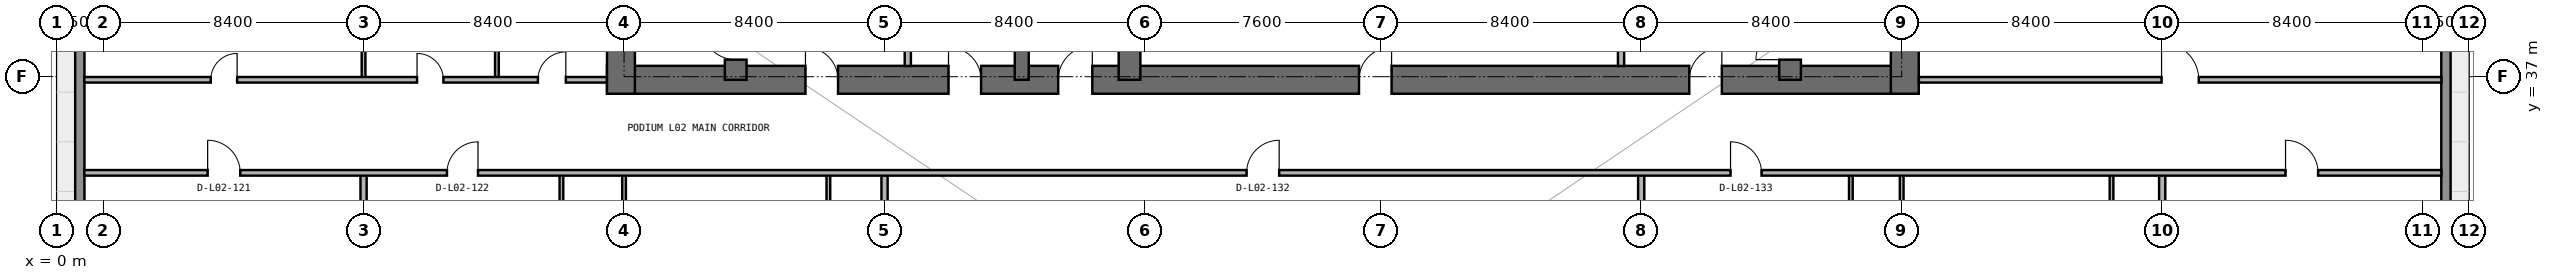
"""IFC4 building model, lengths in metres.
Left out: names, types, materials, properties, quantities, classifications, styles, units other than length and angle.
Written with IfcOpenShell. Run it as: python <this file> out.ifc"""

import sys

from ifc_helpers import new_model, si_unit, direction, frame, frame_2d, origin, place, context, subcontext, project, spatial, rectangle, extrude, element, fill, save


model = new_model("IFC4")
c1 = context("Model", 3, precision=1e-05, world=origin(), true_north=direction((0.0, 1.0)))
c2 = subcontext(c1, "Body", "Model", "MODEL_VIEW")
j1 = project(units=[si_unit("LENGTHUNIT", "METRE"), si_unit("PLANEANGLEUNIT", "RADIAN")], contexts=[c1])
p1 = place(None, origin())
s1 = spatial("IfcSite", under=j1, at=p1, CompositionType="ELEMENT")
p2 = place(p1, origin())
s2 = spatial("IfcBuilding", under=s1, at=p2, CompositionType="ELEMENT")
p3 = place(p2, frame((0.0, 0.0, 10.2)))
s3 = spatial("IfcBuildingStorey", under=s2, at=p3, CompositionType="ELEMENT", Elevation=10.2)
p4 = place(p3, frame((17.75, 36.9, 0.0), z_axis=(0.0, 0.0, 1.0), x_axis=(1.0, 0.0, 0.0)))
e1 = element("IfcWall", 1, at=p4, inside=s3, PredefinedType="SHEAR", context=c2, shape_type="SweptSolid", body=[
    extrude(rectangle(XDim=42.3, YDim=0.9, at=frame_2d((21.15, 0.0))), origin(), (0.0, 0.0, 1.0), 4.5),
])
p5 = place(p4, frame((14.55, 0.0, 0.0)))
e2 = element("IfcOpeningElement", 2, at=p5, cuts=e1, PredefinedType="OPENING", context=c2, shape_type="SweptSolid", body=[
    extrude(rectangle(XDim=1.1, YDim=2.15, at=frame_2d((0.55, 1.075))), frame((0.0, 0.46, 0.0), z_axis=(0.0, -1.0, 0.0), x_axis=(1.0, 0.0, 0.0)), (0.0, 0.0, 1.0), 0.92),
])
p6 = place(p4, frame((6.4, 0.0, 0.0)))
e3 = element("IfcOpeningElement", 3, at=p6, cuts=e1, PredefinedType="OPENING", context=c2, shape_type="SweptSolid", body=[
    extrude(rectangle(XDim=1.05, YDim=2.15, at=frame_2d((0.525, 1.075))), frame((0.0, 0.46, 0.0), z_axis=(0.0, -1.0, 0.0), x_axis=(1.0, 0.0, 0.0)), (0.0, 0.0, 1.0), 0.92),
])
p7 = place(p4, frame((34.9, 0.0, 0.0)))
e4 = element("IfcOpeningElement", 4, at=p7, cuts=e1, PredefinedType="OPENING", context=c2, shape_type="SweptSolid", body=[
    extrude(rectangle(XDim=1.05, YDim=2.15, at=frame_2d((0.525, 1.075))), frame((0.0, 0.46, 0.0), z_axis=(0.0, -1.0, 0.0), x_axis=(1.0, 0.0, 0.0)), (0.0, 0.0, 1.0), 0.92),
])
p8 = place(p4, frame((11.012, 0.0, 0.0)))
e5 = element("IfcOpeningElement", 5, at=p8, cuts=e1, PredefinedType="OPENING", context=c2, shape_type="SweptSolid", body=[
    extrude(rectangle(XDim=1.05, YDim=2.15, at=frame_2d((0.525, 1.075))), frame((0.0, 0.46, 0.0), z_axis=(0.0, -1.0, 0.0), x_axis=(1.0, 0.0, 0.0)), (0.0, 0.0, 1.0), 0.92),
])
p9 = place(p4, frame((24.25, 0.0, 0.0)))
e6 = element("IfcOpeningElement", 6, at=p9, cuts=e1, PredefinedType="OPENING", context=c2, shape_type="SweptSolid", body=[
    extrude(rectangle(XDim=1.05, YDim=2.15, at=frame_2d((0.525, 1.075))), frame((0.0, 0.46, 0.0), z_axis=(0.0, -1.0, 0.0), x_axis=(1.0, 0.0, 0.0)), (0.0, 0.0, 1.0), 0.92),
])
for number, where, z_axis, x_axis in (
    (7, (18.2, 36.45, 0.0), (0.0, 0.0, 1.0), (0.0, 1.0, 0.0)),
    (8, (59.6, 36.45, 0.0), (0.0, 0.0, 1.0), (0.0, 1.0, 0.0)),
):
    element("IfcWall", number, at=place(p3, frame(where, z_axis=z_axis, x_axis=x_axis)), inside=s3, PredefinedType="SHEAR", context=c2, shape_type="SweptSolid", body=[
        extrude(rectangle(XDim=14.15, YDim=0.9, at=frame_2d((7.075, 0.0))), origin(), (0.0, 0.0, 1.0), 4.5),
    ])
p10 = place(p3, frame((21.9, 36.9, 0.0), z_axis=(0.0, 0.0, 1.0), x_axis=(0.0, 1.0, 0.0)))
e9 = element("IfcWall", 9, at=p10, inside=s3, PredefinedType="SHEAR", context=c2, shape_type="SweptSolid", body=[
    extrude(rectangle(XDim=9.675, YDim=0.7, at=frame_2d((4.837, 0.0))), origin(), (0.0, 0.0, 1.0), 4.5),
])
p11 = place(p10, frame((0.65, 0.0, 0.0)))
e10 = element("IfcOpeningElement", 10, at=p11, cuts=e9, PredefinedType="OPENING", context=c2, shape_type="SweptSolid", body=[
    extrude(rectangle(XDim=1.1, YDim=2.15, at=frame_2d((0.55, 1.075))), frame((0.0, 0.36, 0.0), z_axis=(0.0, -1.0, 0.0), x_axis=(1.0, 0.0, 0.0)), (0.0, 0.0, 1.0), 0.72),
])
p12 = place(p3, frame((55.9, 36.9, 0.0), z_axis=(0.0, 0.0, 1.0), x_axis=(0.0, 1.0, 0.0)))
e11 = element("IfcWall", 11, at=p12, inside=s3, PredefinedType="SHEAR", context=c2, shape_type="SweptSolid", body=[
    extrude(rectangle(XDim=9.675, YDim=0.7, at=frame_2d((4.837, 0.0))), origin(), (0.0, 0.0, 1.0), 4.5),
])
p13 = place(p12, frame((0.65, 0.0, 0.0)))
e12 = element("IfcOpeningElement", 12, at=p13, cuts=e11, PredefinedType="OPENING", context=c2, shape_type="SweptSolid", body=[
    extrude(rectangle(XDim=1.1, YDim=2.15, at=frame_2d((0.55, 1.075))), frame((0.0, 0.36, 0.0), z_axis=(0.0, -1.0, 0.0), x_axis=(1.0, 0.0, 0.0)), (0.0, 0.0, 1.0), 0.72),
])
p14 = place(p3, frame((31.125, 36.9, 0.0), z_axis=(0.0, 0.0, 1.0), x_axis=(0.0, 1.0, 0.0)))
e13 = element("IfcWall", 13, at=p14, inside=s3, PredefinedType="SHEAR", context=c2, shape_type="SweptSolid", body=[
    extrude(rectangle(XDim=9.675, YDim=0.45, at=frame_2d((4.837, 0.0))), origin(), (0.0, 0.0, 1.0), 4.5),
])
p15 = place(p3, frame((34.6, 36.9, 0.0), z_axis=(0.0, 0.0, 1.0), x_axis=(0.0, 1.0, 0.0)))
e14 = element("IfcWall", 14, at=p15, inside=s3, PredefinedType="SHEAR", context=c2, shape_type="SweptSolid", body=[
    extrude(rectangle(XDim=9.675, YDim=0.7, at=frame_2d((4.837, 0.0))), origin(), (0.0, 0.0, 1.0), 4.5),
])
for number, where, z_axis, x_axis in (
    (15, (0.75, 26.8, 0.0), (0.0, 0.0, 1.0), (0.0, 1.0, 0.0)),
    (16, (77.05, 52.6, 0.0), (0.0, 0.0, 1.0), (0.0, -1.0, 0.0)),
):
    element("IfcWall", number, at=place(p3, frame(where, z_axis=z_axis, x_axis=x_axis)), inside=s3, PredefinedType="STANDARD", context=c2, shape_type="SweptSolid", body=[
        extrude(rectangle(XDim=25.8, YDim=0.3, at=frame_2d((12.9, 0.0))), origin(), (0.0, 0.0, 1.0), 4.5),
    ])
p16 = place(p3, frame((9.9, 1.295, 0.0), z_axis=(0.0, 0.0, 1.0), x_axis=(0.0, 1.0, 0.0)))
e17 = element("IfcWall", 17, at=p16, inside=s3, PredefinedType="PARTITIONING", context=c2, shape_type="SweptSolid", body=[
    extrude(rectangle(XDim=32.605, YDim=0.2, at=frame_2d((16.302, 0.0))), origin(), (0.0, 0.0, 1.0), 3.464),
])
p17 = place(p3, frame((9.9, 36.9, 0.0), z_axis=(0.0, 0.0, 1.0), x_axis=(0.0, 1.0, 0.0)))
e18 = element("IfcWall", 18, at=p17, inside=s3, PredefinedType="PARTITIONING", context=c2, shape_type="SweptSolid", body=[
    extrude(rectangle(XDim=6.9, YDim=0.12, at=frame_2d((3.45, 0.0))), origin(), (0.0, 0.0, 1.0), 3.464),
])
p18 = place(p3, frame((14.2, 36.9, 0.0), z_axis=(0.0, 0.0, 1.0), x_axis=(0.0, 1.0, 0.0)))
e19 = element("IfcWall", 19, at=p18, inside=s3, PredefinedType="PARTITIONING", context=c2, shape_type="SweptSolid", body=[
    extrude(rectangle(XDim=6.9, YDim=0.12, at=frame_2d((3.45, 0.0))), origin(), (0.0, 0.0, 1.0), 4.5),
])
p19 = place(p3, frame((16.28, 28.8, 0.0), z_axis=(0.0, 0.0, 1.0), x_axis=(0.0, 1.0, 0.0)))
e20 = element("IfcWall", 20, at=p19, inside=s3, PredefinedType="PARTITIONING", context=c2, shape_type="SweptSolid", body=[
    extrude(rectangle(XDim=5.1, YDim=0.12, at=frame_2d((2.55, 0.0))), origin(), (0.0, 0.0, 1.0), 4.5),
])
p20 = place(p19, frame((2.125, 0.0, 0.0)))
e21 = element("IfcOpeningElement", 21, at=p20, cuts=e20, PredefinedType="OPENING", context=c2, shape_type="SweptSolid", body=[
    extrude(rectangle(XDim=0.85, YDim=2.1, at=frame_2d((0.425, 1.05))), frame((0.0, 0.07, 0.0), z_axis=(0.0, -1.0, 0.0), x_axis=(1.0, 0.0, 0.0)), (0.0, 0.0, 1.0), 0.14),
])
p21 = place(p3, frame((18.3, 1.295, 0.0), z_axis=(0.0, 0.0, 1.0), x_axis=(0.0, 1.0, 0.0)))
e22 = element("IfcWall", 22, at=p21, inside=s3, PredefinedType="PARTITIONING", context=c2, shape_type="SweptSolid", body=[
    extrude(rectangle(XDim=32.605, YDim=0.12, at=frame_2d((16.302, 0.0))), origin(), (0.0, 0.0, 1.0), 4.5),
])
p22 = place(p21, frame((24.655, 0.0, 0.0)))
e23 = element("IfcOpeningElement", 23, at=p22, cuts=e22, PredefinedType="OPENING", context=c2, shape_type="SweptSolid", body=[
    extrude(rectangle(XDim=0.9, YDim=2.15, at=frame_2d((0.45, 1.075))), frame((0.0, 0.07, 0.0), z_axis=(0.0, -1.0, 0.0), x_axis=(1.0, 0.0, 0.0)), (0.0, 0.0, 1.0), 0.14),
])
p23 = place(p3, frame((24.889, 28.6, 0.0), z_axis=(0.0, 0.0, 1.0), x_axis=(0.0, 1.0, 0.0)))
e24 = element("IfcWall", 24, at=p23, inside=s3, PredefinedType="PARTITIONING", context=c2, shape_type="SweptSolid", body=[
    extrude(rectangle(XDim=5.3, YDim=0.12, at=frame_2d((2.65, 0.0))), origin(), (0.0, 0.0, 1.0), 4.5),
])
p24 = place(p23, frame((2.225, 0.0, 0.0)))
e25 = element("IfcOpeningElement", 25, at=p24, cuts=e24, PredefinedType="OPENING", context=c2, shape_type="SweptSolid", body=[
    extrude(rectangle(XDim=0.85, YDim=2.1, at=frame_2d((0.425, 1.05))), frame((0.0, 0.07, 0.0), z_axis=(0.0, -1.0, 0.0), x_axis=(1.0, 0.0, 0.0)), (0.0, 0.0, 1.0), 0.14),
])
p25 = place(p3, frame((26.7, 1.295, 0.0), z_axis=(0.0, 0.0, 1.0), x_axis=(0.0, 1.0, 0.0)))
e26 = element("IfcWall", 26, at=p25, inside=s3, PredefinedType="PARTITIONING", context=c2, shape_type="SweptSolid", body=[
    extrude(rectangle(XDim=32.605, YDim=0.2, at=frame_2d((16.302, 0.0))), origin(), (0.0, 0.0, 1.0), 3.464),
])
for number, where, z_axis, x_axis in (
    (27, (27.45, 37.345, 0.0), (0.0, 0.0, 1.0), (0.0, 1.0, 0.0)),
    (28, (50.45, 37.345, 0.0), (0.0, 0.0, 1.0), (0.0, 1.0, 0.0)),
):
    element("IfcWall", number, at=place(p3, frame(where, z_axis=z_axis, x_axis=x_axis)), inside=s3, PredefinedType="PARTITIONING", context=c2, shape_type="SweptSolid", body=[
        extrude(rectangle(XDim=5.385, YDim=0.2, at=frame_2d((2.692, 0.0))), origin(), (0.0, 0.0, 1.0), 4.5),
    ])
p26 = place(p3, frame((51.1, 1.295, 0.0), z_axis=(0.0, 0.0, 1.0), x_axis=(0.0, 1.0, 0.0)))
e29 = element("IfcWall", 29, at=p26, inside=s3, PredefinedType="PARTITIONING", context=c2, shape_type="SweptSolid", body=[
    extrude(rectangle(XDim=32.605, YDim=0.2, at=frame_2d((16.302, 0.0))), origin(), (0.0, 0.0, 1.0), 3.464),
])
p27 = place(p3, frame((57.861, 27.92, 0.0), z_axis=(0.0, 0.0, 1.0), x_axis=(0.0, 1.0, 0.0)))
e30 = element("IfcWall", 30, at=p27, inside=s3, PredefinedType="PARTITIONING", context=c2, shape_type="SweptSolid", body=[
    extrude(rectangle(XDim=5.98, YDim=0.12, at=frame_2d((2.99, 0.0))), origin(), (0.0, 0.0, 1.0), 3.873),
])
p28 = place(p27, frame((2.565, 0.0, 0.0)))
e31 = element("IfcOpeningElement", 31, at=p28, cuts=e30, PredefinedType="OPENING", context=c2, shape_type="SweptSolid", body=[
    extrude(rectangle(XDim=0.85, YDim=2.1, at=frame_2d((0.425, 1.05))), frame((0.0, 0.07, 0.0), z_axis=(0.0, -1.0, 0.0), x_axis=(1.0, 0.0, 0.0)), (0.0, 0.0, 1.0), 0.14),
])
p29 = place(p3, frame((59.5, 1.295, 0.0), z_axis=(0.0, 0.0, 1.0), x_axis=(0.0, 1.0, 0.0)))
e32 = element("IfcWall", 32, at=p29, inside=s3, PredefinedType="PARTITIONING", context=c2, shape_type="SweptSolid", body=[
    extrude(rectangle(XDim=32.605, YDim=0.12, at=frame_2d((16.302, 0.0))), origin(), (0.0, 0.0, 1.0), 4.5),
])
p30 = place(p29, frame((23.775, 0.0, 0.0)))
e33 = element("IfcOpeningElement", 33, at=p30, cuts=e32, PredefinedType="OPENING", context=c2, shape_type="SweptSolid", body=[
    extrude(rectangle(XDim=0.9, YDim=2.15, at=frame_2d((0.45, 1.075))), frame((0.0, 0.07, 0.0), z_axis=(0.0, -1.0, 0.0), x_axis=(1.0, 0.0, 0.0)), (0.0, 0.0, 1.0), 0.14),
])
p31 = place(p3, frame((66.266, 27.72, 0.0), z_axis=(0.0, 0.0, 1.0), x_axis=(0.0, 1.0, 0.0)))
e34 = element("IfcWall", 34, at=p31, inside=s3, PredefinedType="PARTITIONING", context=c2, shape_type="SweptSolid", body=[
    extrude(rectangle(XDim=6.18, YDim=0.12, at=frame_2d((3.09, 0.0))), origin(), (0.0, 0.0, 1.0), 4.5),
])
p32 = place(p31, frame((2.815, 0.0, 0.0)))
e35 = element("IfcOpeningElement", 35, at=p32, cuts=e34, PredefinedType="OPENING", context=c2, shape_type="SweptSolid", body=[
    extrude(rectangle(XDim=0.85, YDim=2.1, at=frame_2d((0.425, 1.05))), frame((0.0, 0.07, 0.0), z_axis=(0.0, -1.0, 0.0), x_axis=(1.0, 0.0, 0.0)), (0.0, 0.0, 1.0), 0.14),
])
p33 = place(p3, frame((67.9, 1.295, 0.0), z_axis=(0.0, 0.0, 1.0), x_axis=(0.0, 1.0, 0.0)))
e36 = element("IfcWall", 36, at=p33, inside=s3, PredefinedType="PARTITIONING", context=c2, shape_type="SweptSolid", body=[
    extrude(rectangle(XDim=32.605, YDim=0.2, at=frame_2d((16.302, 0.0))), origin(), (0.0, 0.0, 1.0), 3.464),
])
p34 = place(p3, frame((0.895, 33.9, 0.0), z_axis=(0.0, 0.0, 1.0), x_axis=(1.0, 0.0, 0.0)))
e37 = element("IfcWall", 37, at=p34, inside=s3, PredefinedType="PARTITIONING", context=c2, shape_type="SweptSolid", body=[
    extrude(rectangle(XDim=76.01, YDim=0.18, at=frame_2d((38.005, 0.0))), origin(), (0.0, 0.0, 1.0), 4.5),
])
p35 = place(p34, frame((3.978, 0.0, 0.0)))
e38 = element("IfcOpeningElement", 38, at=p35, cuts=e37, PredefinedType="OPENING", context=c2, shape_type="SweptSolid", body=[
    extrude(rectangle(XDim=1.05, YDim=2.15, at=frame_2d((0.525, 1.075))), frame((0.0, 0.1, 0.0), z_axis=(0.0, -1.0, 0.0), x_axis=(1.0, 0.0, 0.0)), (0.0, 0.0, 1.0), 0.2),
])
p36 = place(p34, frame((11.695, 0.0, 0.0)))
e39 = element("IfcOpeningElement", 39, at=p36, cuts=e37, PredefinedType="OPENING", context=c2, shape_type="SweptSolid", body=[
    extrude(rectangle(XDim=1.0, YDim=2.2, at=frame_2d((0.5, 1.1))), frame((0.0, 0.1, 0.0), z_axis=(0.0, -1.0, 0.0), x_axis=(1.0, 0.0, 0.0)), (0.0, 0.0, 1.0), 0.2),
])
p37 = place(p34, frame((37.48, 0.0, 0.0)))
e40 = element("IfcOpeningElement", 40, at=p37, cuts=e37, PredefinedType="OPENING", context=c2, shape_type="SweptSolid", body=[
    extrude(rectangle(XDim=1.05, YDim=2.15, at=frame_2d((0.525, 1.075))), frame((0.0, 0.1, 0.0), z_axis=(0.0, -1.0, 0.0), x_axis=(1.0, 0.0, 0.0)), (0.0, 0.0, 1.0), 0.2),
])
p38 = place(p34, frame((53.085, 0.0, 0.0)))
e41 = element("IfcOpeningElement", 41, at=p38, cuts=e37, PredefinedType="OPENING", context=c2, shape_type="SweptSolid", body=[
    extrude(rectangle(XDim=1.0, YDim=2.2, at=frame_2d((0.5, 1.1))), frame((0.0, 0.1, 0.0), z_axis=(0.0, -1.0, 0.0), x_axis=(1.0, 0.0, 0.0)), (0.0, 0.0, 1.0), 0.2),
])
p39 = place(p34, frame((70.982, 0.0, 0.0)))
e42 = element("IfcOpeningElement", 42, at=p39, cuts=e37, PredefinedType="OPENING", context=c2, shape_type="SweptSolid", body=[
    extrude(rectangle(XDim=1.05, YDim=2.15, at=frame_2d((0.525, 1.075))), frame((0.0, 0.1, 0.0), z_axis=(0.0, -1.0, 0.0), x_axis=(1.0, 0.0, 0.0)), (0.0, 0.0, 1.0), 0.2),
])
p40 = place(p3, frame((0.895, 36.9, 0.0), z_axis=(0.0, 0.0, 1.0), x_axis=(1.0, 0.0, 0.0)))
e43 = element("IfcWall", 43, at=p40, inside=s3, PredefinedType="PARTITIONING", context=c2, shape_type="SweptSolid", body=[
    extrude(rectangle(XDim=16.85, YDim=0.18, at=frame_2d((8.425, 0.0))), origin(), (0.0, 0.0, 1.0), 4.5),
])
p41 = place(p40, frame((4.077, 0.0, 0.0)))
e44 = element("IfcOpeningElement", 44, at=p41, cuts=e43, PredefinedType="OPENING", context=c2, shape_type="SweptSolid", body=[
    extrude(rectangle(XDim=0.85, YDim=2.1, at=frame_2d((0.425, 1.05))), frame((0.0, 0.1, 0.0), z_axis=(0.0, -1.0, 0.0), x_axis=(1.0, 0.0, 0.0)), (0.0, 0.0, 1.0), 0.2),
])
p42 = place(p40, frame((10.73, 0.0, 0.0)))
e45 = element("IfcOpeningElement", 45, at=p42, cuts=e43, PredefinedType="OPENING", context=c2, shape_type="SweptSolid", body=[
    extrude(rectangle(XDim=0.85, YDim=2.1, at=frame_2d((0.425, 1.05))), frame((0.0, 0.1, 0.0), z_axis=(0.0, -1.0, 0.0), x_axis=(1.0, 0.0, 0.0)), (0.0, 0.0, 1.0), 0.2),
])
p43 = place(p40, frame((14.627, 0.0, 0.0)))
e46 = element("IfcOpeningElement", 46, at=p43, cuts=e43, PredefinedType="OPENING", context=c2, shape_type="SweptSolid", body=[
    extrude(rectangle(XDim=0.9, YDim=2.15, at=frame_2d((0.45, 1.075))), frame((0.0, 0.1, 0.0), z_axis=(0.0, -1.0, 0.0), x_axis=(1.0, 0.0, 0.0)), (0.0, 0.0, 1.0), 0.2),
])
p44 = place(p3, frame((60.055, 36.9, 0.0), z_axis=(0.0, 0.0, 1.0), x_axis=(1.0, 0.0, 0.0)))
e47 = element("IfcWall", 47, at=p44, inside=s3, PredefinedType="PARTITIONING", context=c2, shape_type="SweptSolid", body=[
    extrude(rectangle(XDim=16.85, YDim=0.18, at=frame_2d((8.425, 0.0))), origin(), (0.0, 0.0, 1.0), 4.5),
])
p45 = place(p44, frame((7.825, 0.0, 0.0)))
e48 = element("IfcOpeningElement", 48, at=p45, cuts=e47, PredefinedType="OPENING", context=c2, shape_type="SweptSolid", body=[
    extrude(rectangle(XDim=1.2, YDim=2.2, at=frame_2d((0.6, 1.1))), frame((0.0, 0.1, 0.0), z_axis=(0.0, -1.0, 0.0), x_axis=(1.0, 0.0, 0.0)), (0.0, 0.0, 1.0), 0.2),
])
p46 = place(p5, origin())
e49 = element("IfcDoor", 49, at=p46, inside=s3, OperationType="SINGLE_SWING_RIGHT", PredefinedType="DOOR", context=c2, shape_type="SweptSolid", body=[
    extrude(rectangle(XDim=1.1, YDim=2.15, at=frame_2d((0.55, 1.075))), frame((0.0, 0.025, 0.0), z_axis=(0.0, -1.0, 0.0), x_axis=(1.0, 0.0, 0.0)), (0.0, 0.0, 1.0), 0.05),
])
fill(e2, e49)
p47 = place(p6, origin())
e50 = element("IfcDoor", 50, at=p47, inside=s3, OperationType="SINGLE_SWING_LEFT", PredefinedType="DOOR", context=c2, shape_type="SweptSolid", body=[
    extrude(rectangle(XDim=1.05, YDim=2.15, at=frame_2d((0.525, 1.075))), frame((0.0, 0.025, 0.0), z_axis=(0.0, -1.0, 0.0), x_axis=(1.0, 0.0, 0.0)), (0.0, 0.0, 1.0), 0.05),
])
fill(e3, e50)
p48 = place(p11, origin())
e51 = element("IfcDoor", 51, at=p48, inside=s3, OperationType="SINGLE_SWING_RIGHT", PredefinedType="DOOR", context=c2, shape_type="SweptSolid", body=[
    extrude(rectangle(XDim=1.1, YDim=2.15, at=frame_2d((0.55, 1.075))), frame((0.0, 0.025, 0.0), z_axis=(0.0, -1.0, 0.0), x_axis=(1.0, 0.0, 0.0)), (0.0, 0.0, 1.0), 0.05),
])
fill(e10, e51)
p49 = place(p7, origin())
e52 = element("IfcDoor", 52, at=p49, inside=s3, OperationType="SINGLE_SWING_RIGHT", PredefinedType="DOOR", context=c2, shape_type="SweptSolid", body=[
    extrude(rectangle(XDim=1.05, YDim=2.15, at=frame_2d((0.525, 1.075))), frame((0.0, 0.025, 0.0), z_axis=(0.0, -1.0, 0.0), x_axis=(1.0, 0.0, 0.0)), (0.0, 0.0, 1.0), 0.05),
])
fill(e4, e52)
p50 = place(p13, origin())
e53 = element("IfcDoor", 53, at=p50, inside=s3, OperationType="SINGLE_SWING_LEFT", PredefinedType="DOOR", context=c2, shape_type="SweptSolid", body=[
    extrude(rectangle(XDim=1.1, YDim=2.15, at=frame_2d((0.55, 1.075))), frame((0.0, 0.025, 0.0), z_axis=(0.0, -1.0, 0.0), x_axis=(1.0, 0.0, 0.0)), (0.0, 0.0, 1.0), 0.05),
])
fill(e12, e53)
p51 = place(p8, origin())
e54 = element("IfcDoor", 54, at=p51, inside=s3, OperationType="SINGLE_SWING_LEFT", PredefinedType="DOOR", context=c2, shape_type="SweptSolid", body=[
    extrude(rectangle(XDim=1.05, YDim=2.15, at=frame_2d((0.525, 1.075))), frame((0.0, 0.025, 0.0), z_axis=(0.0, -1.0, 0.0), x_axis=(1.0, 0.0, 0.0)), (0.0, 0.0, 1.0), 0.05),
])
fill(e5, e54)
p52 = place(p9, origin())
e55 = element("IfcDoor", 55, at=p52, inside=s3, OperationType="SINGLE_SWING_RIGHT", PredefinedType="DOOR", context=c2, shape_type="SweptSolid", body=[
    extrude(rectangle(XDim=1.05, YDim=2.15, at=frame_2d((0.525, 1.075))), frame((0.0, 0.025, 0.0), z_axis=(0.0, -1.0, 0.0), x_axis=(1.0, 0.0, 0.0)), (0.0, 0.0, 1.0), 0.05),
])
fill(e6, e55)
p53 = place(p35, origin())
e56 = element("IfcDoor", 56, at=p53, inside=s3, OperationType="SINGLE_SWING_LEFT", PredefinedType="DOOR", context=c2, shape_type="SweptSolid", body=[
    extrude(rectangle(XDim=1.05, YDim=2.15, at=frame_2d((0.525, 1.075))), frame((0.0, 0.025, 0.0), z_axis=(0.0, -1.0, 0.0), x_axis=(1.0, 0.0, 0.0)), (0.0, 0.0, 1.0), 0.05),
])
fill(e38, e56)
p54 = place(p36, origin())
e57 = element("IfcDoor", 57, at=p54, inside=s3, OperationType="SINGLE_SWING_RIGHT", PredefinedType="DOOR", context=c2, shape_type="SweptSolid", body=[
    extrude(rectangle(XDim=1.0, YDim=2.2, at=frame_2d((0.5, 1.1))), frame((0.0, 0.025, 0.0), z_axis=(0.0, -1.0, 0.0), x_axis=(1.0, 0.0, 0.0)), (0.0, 0.0, 1.0), 0.05),
])
fill(e39, e57)
p55 = place(p37, origin())
e58 = element("IfcDoor", 58, at=p55, inside=s3, OperationType="SINGLE_SWING_RIGHT", PredefinedType="DOOR", context=c2, shape_type="SweptSolid", body=[
    extrude(rectangle(XDim=1.05, YDim=2.15, at=frame_2d((0.525, 1.075))), frame((0.0, 0.025, 0.0), z_axis=(0.0, -1.0, 0.0), x_axis=(1.0, 0.0, 0.0)), (0.0, 0.0, 1.0), 0.05),
])
fill(e40, e58)
p56 = place(p38, origin())
e59 = element("IfcDoor", 59, at=p56, inside=s3, OperationType="SINGLE_SWING_LEFT", PredefinedType="DOOR", context=c2, shape_type="SweptSolid", body=[
    extrude(rectangle(XDim=1.0, YDim=2.2, at=frame_2d((0.5, 1.1))), frame((0.0, 0.025, 0.0), z_axis=(0.0, -1.0, 0.0), x_axis=(1.0, 0.0, 0.0)), (0.0, 0.0, 1.0), 0.05),
])
fill(e41, e59)
p57 = place(p39, origin())
e60 = element("IfcDoor", 60, at=p57, inside=s3, OperationType="SINGLE_SWING_LEFT", PredefinedType="DOOR", context=c2, shape_type="SweptSolid", body=[
    extrude(rectangle(XDim=1.05, YDim=2.15, at=frame_2d((0.525, 1.075))), frame((0.0, 0.025, 0.0), z_axis=(0.0, -1.0, 0.0), x_axis=(1.0, 0.0, 0.0)), (0.0, 0.0, 1.0), 0.05),
])
fill(e42, e60)
p58 = place(p41, origin())
e61 = element("IfcDoor", 61, at=p58, inside=s3, OperationType="SINGLE_SWING_RIGHT", PredefinedType="DOOR", context=c2, shape_type="SweptSolid", body=[
    extrude(rectangle(XDim=0.85, YDim=2.1, at=frame_2d((0.425, 1.05))), frame((0.0, 0.025, 0.0), z_axis=(0.0, -1.0, 0.0), x_axis=(1.0, 0.0, 0.0)), (0.0, 0.0, 1.0), 0.05),
])
fill(e44, e61)
p59 = place(p42, origin())
e62 = element("IfcDoor", 62, at=p59, inside=s3, OperationType="SINGLE_SWING_LEFT", PredefinedType="DOOR", context=c2, shape_type="SweptSolid", body=[
    extrude(rectangle(XDim=0.85, YDim=2.1, at=frame_2d((0.425, 1.05))), frame((0.0, 0.025, 0.0), z_axis=(0.0, -1.0, 0.0), x_axis=(1.0, 0.0, 0.0)), (0.0, 0.0, 1.0), 0.05),
])
fill(e45, e62)
p60 = place(p43, origin())
e63 = element("IfcDoor", 63, at=p60, inside=s3, OperationType="SINGLE_SWING_RIGHT", PredefinedType="DOOR", context=c2, shape_type="SweptSolid", body=[
    extrude(rectangle(XDim=0.9, YDim=2.15, at=frame_2d((0.45, 1.075))), frame((0.0, 0.025, 0.0), z_axis=(0.0, -1.0, 0.0), x_axis=(1.0, 0.0, 0.0)), (0.0, 0.0, 1.0), 0.05),
])
fill(e46, e63)
p61 = place(p45, origin())
e64 = element("IfcDoor", 64, at=p61, inside=s3, OperationType="SINGLE_SWING_LEFT", PredefinedType="DOOR", context=c2, shape_type="SweptSolid", body=[
    extrude(rectangle(XDim=1.2, YDim=2.2, at=frame_2d((0.6, 1.1))), frame((0.0, 0.025, 0.0), z_axis=(0.0, -1.0, 0.0), x_axis=(1.0, 0.0, 0.0)), (0.0, 0.0, 1.0), 0.05),
])
fill(e48, e64)
save(model, sys.argv[1])
